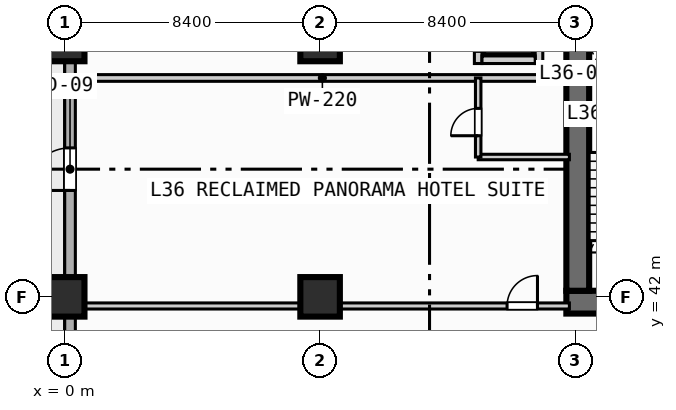
"""IFC4 building model, lengths in metres.
Left out: names, types, materials, properties, quantities, classifications, styles, units other than length and angle.
Written with IfcOpenShell. Run it as: python <this file> out.ifc"""

import sys

from ifc_helpers import new_model, si_unit, direction, frame, frame_2d, origin, origin_2d, place, context, subcontext, project, spatial, rectangle, extrude, element, fill, save


model = new_model("IFC4")
c1 = context("Model", 3, precision=1e-05, world=origin(), true_north=direction((0.0, 1.0)))
c2 = subcontext(c1, "Body", "Model", "MODEL_VIEW")
j1 = project(units=[si_unit("LENGTHUNIT", "METRE"), si_unit("PLANEANGLEUNIT", "RADIAN")], contexts=[c1])
p1 = place(None, origin())
s1 = spatial("IfcSite", under=j1, at=p1, CompositionType="ELEMENT")
p2 = place(p1, origin())
s2 = spatial("IfcBuilding", under=s1, at=p2, CompositionType="ELEMENT")
p3 = place(p2, frame((0.0, 0.0, 149.4)))
s3 = spatial("IfcBuildingStorey", under=s2, at=p3, CompositionType="ELEMENT", Elevation=149.4)
p4 = place(p3, frame((16.5, 41.825, 0.0), z_axis=(0.0, 0.0, 1.0), x_axis=(1.0, 0.0, 0.0)))
e1 = element("IfcWall", 1, at=p4, inside=s3, PredefinedType="SHEAR", context=c2, shape_type="SweptSolid", body=[
    extrude(rectangle(XDim=1.5, YDim=0.75, at=frame_2d((0.75, 0.0))), origin(), (0.0, 0.0, 1.0), 3.55),
])
p5 = place(p3, frame((16.875, 42.2, 0.0), z_axis=(0.0, 0.0, 1.0), x_axis=(0.0, 1.0, 0.0)))
e2 = element("IfcWall", 2, at=p5, inside=s3, PredefinedType="SHEAR", context=c2, shape_type="SweptSolid", body=[
    extrude(rectangle(XDim=16.35, YDim=0.75, at=frame_2d((8.175, 0.0))), origin(), (0.0, 0.0, 1.0), 3.55),
])
for number, where, z_axis, x_axis in (
    (3, (0.0, 42.0, 0.0), (0.0, 0.0, 1.0), (1.0, 0.0, 0.0)),
    (4, (0.0, 50.4, 0.0), (0.0, 0.0, 1.0), (1.0, 0.0, 0.0)),
    (5, (8.4, 42.0, 0.0), (0.0, 0.0, 1.0), (1.0, 0.0, 0.0)),
    (6, (8.4, 50.4, 0.0), (0.0, 0.0, 1.0), (1.0, 0.0, 0.0)),
):
    element("IfcColumn", number, at=place(p3, frame(where, z_axis=z_axis, x_axis=x_axis)), inside=s3, PredefinedType="COLUMN", context=c2, shape_type="SweptSolid", body=[
        extrude(rectangle(XDim=1.3, YDim=1.3, at=origin_2d()), origin(), (0.0, 0.0, 1.0), 3.8),
    ])
p6 = place(p3, frame((0.175, 3.175, 0.0), z_axis=(0.0, 0.0, 1.0), x_axis=(0.0, 1.0, 0.0)))
e7 = element("IfcWall", 7, at=p6, inside=s3, PredefinedType="STANDARD", context=c2, shape_type="SweptSolid", body=[
    extrude(rectangle(XDim=86.05, YDim=0.35, at=frame_2d((43.025, 0.0))), origin(), (0.0, 0.0, 1.0), 3.55),
])
p7 = place(p6, frame((42.325, 0.0, 0.0)))
e8 = element("IfcOpeningElement", 8, at=p7, cuts=e7, PredefinedType="OPENING", context=c2, shape_type="SweptSolid", body=[
    extrude(rectangle(XDim=1.4, YDim=2.2, at=frame_2d((0.7, 1.1))), frame((0.0, 0.185, 0.0), z_axis=(0.0, -1.0, 0.0), x_axis=(1.0, 0.0, 0.0)), (0.0, 0.0, 1.0), 0.37),
])
p8 = place(p6, frame((25.125, 0.0, 0.85)))
e9 = element("IfcOpeningElement", 9, at=p8, cuts=e7, PredefinedType="OPENING", context=c2, shape_type="SweptSolid", body=[
    extrude(rectangle(XDim=2.2, YDim=1.8, at=frame_2d((1.1, 0.9))), frame((0.0, 0.185, 0.0), z_axis=(0.0, -1.0, 0.0), x_axis=(1.0, 0.0, 0.0)), (0.0, 0.0, 1.0), 0.37),
])
p9 = place(p6, frame((33.525, 0.0, 0.85)))
e10 = element("IfcOpeningElement", 10, at=p9, cuts=e7, PredefinedType="OPENING", context=c2, shape_type="SweptSolid", body=[
    extrude(rectangle(XDim=2.2, YDim=1.8, at=frame_2d((1.1, 0.9))), frame((0.0, 0.185, 0.0), z_axis=(0.0, -1.0, 0.0), x_axis=(1.0, 0.0, 0.0)), (0.0, 0.0, 1.0), 0.37),
])
p10 = place(p6, frame((58.725, 0.0, 0.85)))
e11 = element("IfcOpeningElement", 11, at=p10, cuts=e7, PredefinedType="OPENING", context=c2, shape_type="SweptSolid", body=[
    extrude(rectangle(XDim=2.2, YDim=1.8, at=frame_2d((1.1, 0.9))), frame((0.0, 0.185, 0.0), z_axis=(0.0, -1.0, 0.0), x_axis=(1.0, 0.0, 0.0)), (0.0, 0.0, 1.0), 0.37),
])
p11 = place(p6, frame((65.125, 0.0, 0.85)))
e12 = element("IfcOpeningElement", 12, at=p11, cuts=e7, PredefinedType="OPENING", context=c2, shape_type="SweptSolid", body=[
    extrude(rectangle(XDim=1.8, YDim=1.8, at=frame_2d((0.9, 0.9))), frame((0.0, 0.185, 0.0), z_axis=(0.0, -1.0, 0.0), x_axis=(1.0, 0.0, 0.0)), (0.0, 0.0, 1.0), 0.37),
])
p12 = place(p6, frame((73.275, 0.0, 0.85)))
e13 = element("IfcOpeningElement", 13, at=p12, cuts=e7, PredefinedType="OPENING", context=c2, shape_type="SweptSolid", body=[
    extrude(rectangle(XDim=1.8, YDim=1.8, at=frame_2d((0.9, 0.9))), frame((0.0, 0.185, 0.0), z_axis=(0.0, -1.0, 0.0), x_axis=(1.0, 0.0, 0.0)), (0.0, 0.0, 1.0), 0.37),
])
p13 = place(p6, frame((81.625, 0.0, 0.85)))
e14 = element("IfcOpeningElement", 14, at=p13, cuts=e7, PredefinedType="OPENING", context=c2, shape_type="SweptSolid", body=[
    extrude(rectangle(XDim=1.8, YDim=1.8, at=frame_2d((0.9, 0.9))), frame((0.0, 0.185, 0.0), z_axis=(0.0, -1.0, 0.0), x_axis=(1.0, 0.0, 0.0)), (0.0, 0.0, 1.0), 0.37),
])
p14 = place(p3, frame((13.6, 49.675, 0.0), z_axis=(0.0, 0.0, 1.0), x_axis=(0.0, 1.0, 0.0)))
e15 = element("IfcWall", 15, at=p14, inside=s3, PredefinedType="SOLIDWALL", context=c2, shape_type="SweptSolid", body=[
    extrude(rectangle(XDim=2.75, YDim=0.25, at=frame_2d((1.375, 0.0))), origin(), (0.0, 0.0, 1.0), 3.55),
])
p15 = place(p14, frame((0.4, 0.0, 0.0)))
e16 = element("IfcOpeningElement", 16, at=p15, cuts=e15, PredefinedType="OPENING", context=c2, shape_type="SweptSolid", body=[
    extrude(rectangle(XDim=1.1, YDim=2.15, at=frame_2d((0.55, 1.075))), frame((0.0, 0.135, 0.0), z_axis=(0.0, -1.0, 0.0), x_axis=(1.0, 0.0, 0.0)), (0.0, 0.0, 1.0), 0.27),
])
p16 = place(p3, frame((15.6, 49.675, 0.0), z_axis=(0.0, 0.0, 1.0), x_axis=(0.0, 1.0, 0.0)))
e17 = element("IfcWall", 17, at=p16, inside=s3, PredefinedType="SOLIDWALL", context=c2, shape_type="SweptSolid", body=[
    extrude(rectangle(XDim=2.75, YDim=0.25, at=frame_2d((1.375, 0.0))), origin(), (0.0, 0.0, 1.0), 3.55),
])
p17 = place(p3, frame((13.725, 49.8, 0.0), z_axis=(0.0, 0.0, 1.0), x_axis=(1.0, 0.0, 0.0)))
e18 = element("IfcWall", 18, at=p17, inside=s3, PredefinedType="SOLIDWALL", context=c2, shape_type="SweptSolid", body=[
    extrude(rectangle(XDim=1.75, YDim=0.25, at=frame_2d((0.875, 0.0))), origin(), (0.0, 0.0, 1.0), 3.55),
])
p18 = place(p3, frame((0.35, 41.7, 0.0), z_axis=(0.0, 0.0, 1.0), x_axis=(1.0, 0.0, 0.0)))
e19 = element("IfcWall", 19, at=p18, inside=s3, PredefinedType="PARTITIONING", context=c2, shape_type="SweptSolid", body=[
    extrude(rectangle(XDim=16.25, YDim=0.2, at=frame_2d((8.125, 0.0))), origin(), (0.0, 0.0, 1.0), 2.9),
])
p19 = place(p18, frame((14.2, 0.0, 0.0)))
e20 = element("IfcOpeningElement", 20, at=p19, cuts=e19, PredefinedType="OPENING", context=c2, shape_type="SweptSolid", body=[
    extrude(rectangle(XDim=1.0, YDim=2.15, at=frame_2d((0.5, 1.075))), frame((0.0, 0.11, 0.0), z_axis=(0.0, -1.0, 0.0), x_axis=(1.0, 0.0, 0.0)), (0.0, 0.0, 1.0), 0.22),
])
p20 = place(p3, frame((0.35, 49.2, 0.0), z_axis=(0.0, 0.0, 1.0), x_axis=(1.0, 0.0, 0.0)))
e21 = element("IfcWall", 21, at=p20, inside=s3, PredefinedType="PARTITIONING", context=c2, shape_type="SweptSolid", body=[
    extrude(rectangle(XDim=16.25, YDim=0.22, at=frame_2d((8.125, 0.0))), origin(), (0.0, 0.0, 1.0), 3.55),
])
p21 = place(p3, frame((13.6, 46.6, 0.0), z_axis=(0.0, 0.0, 1.0), x_axis=(1.0, 0.0, 0.0)))
e22 = element("IfcWall", 22, at=p21, inside=s3, PredefinedType="PLUMBINGWALL", context=c2, shape_type="SweptSolid", body=[
    extrude(rectangle(XDim=3.0, YDim=0.18, at=frame_2d((1.5, 0.0))), origin(), (0.0, 0.0, 1.0), 3.55),
])
p22 = place(p3, frame((13.6, 46.6, 0.0), z_axis=(0.0, 0.0, 1.0), x_axis=(0.0, 1.0, 0.0)))
e23 = element("IfcWall", 23, at=p22, inside=s3, PredefinedType="PLUMBINGWALL", context=c2, shape_type="SweptSolid", body=[
    extrude(rectangle(XDim=2.6, YDim=0.18, at=frame_2d((1.3, 0.0))), origin(), (0.0, 0.0, 1.0), 3.55),
])
p23 = place(p22, frame((0.7, 0.0, 0.0)))
e24 = element("IfcOpeningElement", 24, at=p23, cuts=e23, PredefinedType="OPENING", context=c2, shape_type="SweptSolid", body=[
    extrude(rectangle(XDim=0.9, YDim=2.1, at=frame_2d((0.45, 1.05))), frame((0.0, 0.1, 0.0), z_axis=(0.0, -1.0, 0.0), x_axis=(1.0, 0.0, 0.0)), (0.0, 0.0, 1.0), 0.2),
])
p24 = place(p7, origin())
e25 = element("IfcDoor", 25, at=p24, inside=s3, OperationType="SINGLE_SWING_LEFT", PredefinedType="DOOR", context=c2, shape_type="SweptSolid", body=[
    extrude(rectangle(XDim=1.4, YDim=2.2, at=frame_2d((0.7, 1.1))), frame((0.0, 0.025, 0.0), z_axis=(0.0, -1.0, 0.0), x_axis=(1.0, 0.0, 0.0)), (0.0, 0.0, 1.0), 0.05),
])
fill(e8, e25)
p25 = place(p19, origin())
e26 = element("IfcDoor", 26, at=p25, inside=s3, OperationType="SINGLE_SWING_RIGHT", PredefinedType="DOOR", context=c2, shape_type="SweptSolid", body=[
    extrude(rectangle(XDim=1.0, YDim=2.15, at=frame_2d((0.5, 1.075))), frame((0.0, 0.025, 0.0), z_axis=(0.0, -1.0, 0.0), x_axis=(1.0, 0.0, 0.0)), (0.0, 0.0, 1.0), 0.05),
])
fill(e20, e26)
p26 = place(p23, origin())
e27 = element("IfcDoor", 27, at=p26, inside=s3, OperationType="SINGLE_SWING_LEFT", PredefinedType="DOOR", context=c2, shape_type="SweptSolid", body=[
    extrude(rectangle(XDim=0.9, YDim=2.1, at=frame_2d((0.45, 1.05))), frame((0.0, 0.025, 0.0), z_axis=(0.0, -1.0, 0.0), x_axis=(1.0, 0.0, 0.0)), (0.0, 0.0, 1.0), 0.05),
])
fill(e24, e27)
save(model, sys.argv[1])
